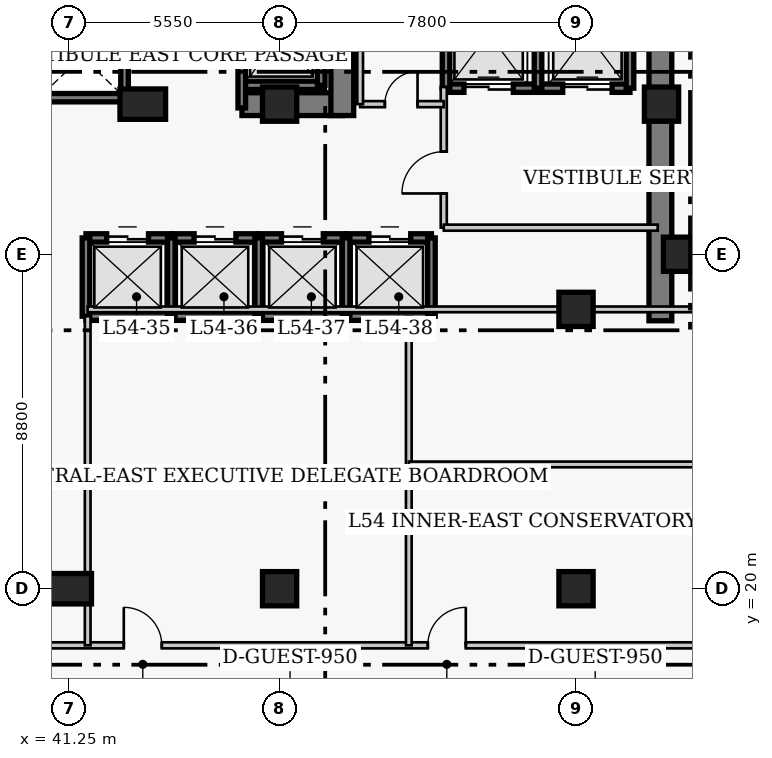
"""IFC4 building model, lengths in metres.
Left out: names, types, materials, properties, quantities, classifications, styles, units other than length and angle.
Written with IfcOpenShell. Run it as: python <this file> out.ifc"""

import sys

from ifc_helpers import new_model, si_unit, direction, frame, frame_2d, origin, origin_2d, place, context, subcontext, project, spatial, rectangle, extrude, element, fill, save


model = new_model("IFC4")
c1 = context("Model", 3, precision=1e-05, world=origin(), true_north=direction((0.0, 1.0)))
c2 = subcontext(c1, "Body", "Model", "MODEL_VIEW")
j1 = project(units=[si_unit("LENGTHUNIT", "METRE"), si_unit("PLANEANGLEUNIT", "RADIAN")], contexts=[c1])
p1 = place(None, origin())
s1 = spatial("IfcSite", under=j1, at=p1, CompositionType="ELEMENT")
p2 = place(p1, origin())
s2 = spatial("IfcBuilding", under=s1, at=p2, CompositionType="ELEMENT")
p3 = place(p2, frame((0.0, 0.0, 216.3)))
s3 = spatial("IfcBuildingStorey", under=s2, at=p3, CompositionType="ELEMENT", Elevation=216.3)
p4 = place(p3, frame((56.82, 27.05, 0.0), z_axis=(0.0, 0.0, 1.0), x_axis=(0.0, 1.0, 0.0)))
e1 = element("IfcWall", 1, at=p4, inside=s3, PredefinedType="SHEAR", context=c2, shape_type="SweptSolid", body=[
    extrude(rectangle(XDim=13.57, YDim=0.6, at=frame_2d((6.785, 0.0))), origin(), (0.0, 0.0, 1.0), 3.9),
])
p5 = place(p3, frame((45.81, 32.75, 0.0), z_axis=(0.0, 0.0, 1.0), x_axis=(1.0, 0.0, 0.0)))
e2 = element("IfcWall", 2, at=p5, inside=s3, PredefinedType="SHEAR", context=c2, shape_type="SweptSolid", body=[
    extrude(rectangle(XDim=2.64, YDim=0.6, at=frame_2d((1.32, 0.0))), origin(), (0.0, 0.0, 1.0), 3.9),
])
p6 = place(p3, frame((48.45, 32.45, 0.0), z_axis=(0.0, 0.0, 1.0), x_axis=(0.0, 1.0, 0.0)))
e3 = element("IfcWall", 3, at=p6, inside=s3, PredefinedType="SHEAR", context=c2, shape_type="SweptSolid", body=[
    extrude(rectangle(XDim=7.87, YDim=0.6, at=frame_2d((3.935, 0.0))), origin(), (0.0, 0.0, 1.0), 3.9),
])
p7 = place(p6, frame((5.75, 0.0, 0.0)))
e4 = element("IfcOpeningElement", 4, at=p7, cuts=e3, PredefinedType="OPENING", context=c2, shape_type="SweptSolid", body=[
    extrude(rectangle(XDim=1.1, YDim=2.15, at=frame_2d((0.55, 1.075))), frame((0.0, 0.31, 0.0), z_axis=(0.0, -1.0, 0.0), x_axis=(1.0, 0.0, 0.0)), (0.0, 0.0, 1.0), 0.62),
])
p8 = place(p3, frame((41.25, 20.0, 0.0), z_axis=(0.0, 0.0, 1.0), x_axis=(1.0, 0.0, 0.0)))
e5 = element("IfcColumn", 5, at=p8, inside=s3, PredefinedType="COLUMN", context=c2, shape_type="SweptSolid", body=[
    extrude(rectangle(XDim=1.2, YDim=0.8, at=origin_2d()), origin(), (0.0, 0.0, 1.0), 3.9),
])
for number, where, z_axis, x_axis in (
    (6, (46.8, 20.0, 0.0), (0.0, 0.0, 1.0), (1.0, 0.0, 0.0)),
    (7, (54.6, 20.0, 0.0), (0.0, 0.0, 1.0), (1.0, 0.0, 0.0)),
    (8, (57.35, 28.8, 0.0), (0.0, 0.0, 1.0), (1.0, 0.0, 0.0)),
):
    element("IfcColumn", number, at=place(p3, frame(where, z_axis=z_axis, x_axis=x_axis)), inside=s3, PredefinedType="COLUMN", context=c2, shape_type="SweptSolid", body=[
        extrude(rectangle(XDim=0.9, YDim=0.9, at=origin_2d()), origin(), (0.0, 0.0, 1.0), 3.9),
    ])
p9 = place(p3, frame((43.2, 32.75, 0.0), z_axis=(0.0, 0.0, 1.0), x_axis=(1.0, 0.0, 0.0)))
e9 = element("IfcColumn", 9, at=p9, inside=s3, PredefinedType="COLUMN", context=c2, shape_type="SweptSolid", body=[
    extrude(rectangle(XDim=1.2, YDim=0.8, at=origin_2d()), origin(), (0.0, 0.0, 1.0), 3.9),
])
for number, where, z_axis, x_axis in (
    (10, (46.8, 32.75, 0.0), (0.0, 0.0, 1.0), (1.0, 0.0, 0.0)),
    (11, (54.6, 27.35, 0.0), (0.0, 0.0, 1.0), (1.0, 0.0, 0.0)),
    (12, (56.85, 32.75, 0.0), (0.0, 0.0, 1.0), (1.0, 0.0, 0.0)),
):
    element("IfcColumn", number, at=place(p3, frame(where, z_axis=z_axis, x_axis=x_axis)), inside=s3, PredefinedType="COLUMN", context=c2, shape_type="SweptSolid", body=[
        extrude(rectangle(XDim=0.9, YDim=0.9, at=origin_2d()), origin(), (0.0, 0.0, 1.0), 3.9),
    ])
p10 = place(p3, frame((41.705, 29.23, 0.0), z_axis=(0.0, 0.0, 1.0), x_axis=(1.0, 0.0, 0.0)))
e13 = element("IfcWall", 13, at=p10, inside=s3, PredefinedType="SHEAR", context=c2, shape_type="SweptSolid", body=[
    extrude(rectangle(XDim=2.245, YDim=0.22, at=frame_2d((1.123, 0.0))), origin(), (0.0, 0.0, 1.0), 3.9),
])
p11 = place(p10, frame((0.545, 0.0, 0.0)))
e14 = element("IfcOpeningElement", 14, at=p11, cuts=e13, PredefinedType="OPENING", context=c2, shape_type="SweptSolid", body=[
    extrude(rectangle(XDim=1.1, YDim=2.15, at=frame_2d((0.55, 1.075))), frame((0.0, 0.12, 0.0), z_axis=(0.0, -1.0, 0.0), x_axis=(1.0, 0.0, 0.0)), (0.0, 0.0, 1.0), 0.24),
])
p12 = place(p3, frame((41.705, 27.17, 0.0), z_axis=(0.0, 0.0, 1.0), x_axis=(1.0, 0.0, 0.0)))
e15 = element("IfcWall", 15, at=p12, inside=s3, PredefinedType="SHEAR", context=c2, shape_type="SweptSolid", body=[
    extrude(rectangle(XDim=2.245, YDim=0.22, at=frame_2d((1.123, 0.0))), origin(), (0.0, 0.0, 1.0), 3.9),
])
p13 = place(p3, frame((41.705, 27.17, 0.0), z_axis=(0.0, 0.0, 1.0), x_axis=(0.0, 1.0, 0.0)))
e16 = element("IfcWall", 16, at=p13, inside=s3, PredefinedType="SHEAR", context=c2, shape_type="SweptSolid", body=[
    extrude(rectangle(XDim=2.06, YDim=0.2, at=frame_2d((1.03, 0.0))), origin(), (0.0, 0.0, 1.0), 3.9),
])
p14 = place(p3, frame((43.95, 29.23, 0.0), z_axis=(0.0, 0.0, 1.0), x_axis=(1.0, 0.0, 0.0)))
e17 = element("IfcWall", 17, at=p14, inside=s3, PredefinedType="SHEAR", context=c2, shape_type="SweptSolid", body=[
    extrude(rectangle(XDim=2.3, YDim=0.22, at=frame_2d((1.15, 0.0))), origin(), (0.0, 0.0, 1.0), 3.9),
])
p15 = place(p14, frame((0.6, 0.0, 0.0)))
e18 = element("IfcOpeningElement", 18, at=p15, cuts=e17, PredefinedType="OPENING", context=c2, shape_type="SweptSolid", body=[
    extrude(rectangle(XDim=1.1, YDim=2.15, at=frame_2d((0.55, 1.075))), frame((0.0, 0.12, 0.0), z_axis=(0.0, -1.0, 0.0), x_axis=(1.0, 0.0, 0.0)), (0.0, 0.0, 1.0), 0.24),
])
p16 = place(p3, frame((43.95, 27.17, 0.0), z_axis=(0.0, 0.0, 1.0), x_axis=(1.0, 0.0, 0.0)))
e19 = element("IfcWall", 19, at=p16, inside=s3, PredefinedType="SHEAR", context=c2, shape_type="SweptSolid", body=[
    extrude(rectangle(XDim=2.3, YDim=0.22, at=frame_2d((1.15, 0.0))), origin(), (0.0, 0.0, 1.0), 3.9),
])
p17 = place(p3, frame((43.95, 27.17, 0.0), z_axis=(0.0, 0.0, 1.0), x_axis=(0.0, 1.0, 0.0)))
e20 = element("IfcWall", 20, at=p17, inside=s3, PredefinedType="SHEAR", context=c2, shape_type="SweptSolid", body=[
    extrude(rectangle(XDim=2.06, YDim=0.2, at=frame_2d((1.03, 0.0))), origin(), (0.0, 0.0, 1.0), 3.9),
])
p18 = place(p3, frame((46.25, 29.23, 0.0), z_axis=(0.0, 0.0, 1.0), x_axis=(1.0, 0.0, 0.0)))
e21 = element("IfcWall", 21, at=p18, inside=s3, PredefinedType="SHEAR", context=c2, shape_type="SweptSolid", body=[
    extrude(rectangle(XDim=2.3, YDim=0.22, at=frame_2d((1.15, 0.0))), origin(), (0.0, 0.0, 1.0), 3.9),
])
p19 = place(p18, frame((0.6, 0.0, 0.0)))
e22 = element("IfcOpeningElement", 22, at=p19, cuts=e21, PredefinedType="OPENING", context=c2, shape_type="SweptSolid", body=[
    extrude(rectangle(XDim=1.1, YDim=2.15, at=frame_2d((0.55, 1.075))), frame((0.0, 0.12, 0.0), z_axis=(0.0, -1.0, 0.0), x_axis=(1.0, 0.0, 0.0)), (0.0, 0.0, 1.0), 0.24),
])
p20 = place(p3, frame((46.25, 27.17, 0.0), z_axis=(0.0, 0.0, 1.0), x_axis=(1.0, 0.0, 0.0)))
e23 = element("IfcWall", 23, at=p20, inside=s3, PredefinedType="SHEAR", context=c2, shape_type="SweptSolid", body=[
    extrude(rectangle(XDim=2.3, YDim=0.22, at=frame_2d((1.15, 0.0))), origin(), (0.0, 0.0, 1.0), 3.9),
])
p21 = place(p3, frame((46.25, 27.17, 0.0), z_axis=(0.0, 0.0, 1.0), x_axis=(0.0, 1.0, 0.0)))
e24 = element("IfcWall", 24, at=p21, inside=s3, PredefinedType="SHEAR", context=c2, shape_type="SweptSolid", body=[
    extrude(rectangle(XDim=2.06, YDim=0.2, at=frame_2d((1.03, 0.0))), origin(), (0.0, 0.0, 1.0), 3.9),
])
p22 = place(p3, frame((48.55, 29.23, 0.0), z_axis=(0.0, 0.0, 1.0), x_axis=(1.0, 0.0, 0.0)))
e25 = element("IfcWall", 25, at=p22, inside=s3, PredefinedType="SHEAR", context=c2, shape_type="SweptSolid", body=[
    extrude(rectangle(XDim=2.245, YDim=0.22, at=frame_2d((1.123, 0.0))), origin(), (0.0, 0.0, 1.0), 3.9),
])
p23 = place(p22, frame((0.6, 0.0, 0.0)))
e26 = element("IfcOpeningElement", 26, at=p23, cuts=e25, PredefinedType="OPENING", context=c2, shape_type="SweptSolid", body=[
    extrude(rectangle(XDim=1.1, YDim=2.15, at=frame_2d((0.55, 1.075))), frame((0.0, 0.12, 0.0), z_axis=(0.0, -1.0, 0.0), x_axis=(1.0, 0.0, 0.0)), (0.0, 0.0, 1.0), 0.24),
])
p24 = place(p3, frame((48.55, 27.17, 0.0), z_axis=(0.0, 0.0, 1.0), x_axis=(1.0, 0.0, 0.0)))
e27 = element("IfcWall", 27, at=p24, inside=s3, PredefinedType="SHEAR", context=c2, shape_type="SweptSolid", body=[
    extrude(rectangle(XDim=2.245, YDim=0.22, at=frame_2d((1.123, 0.0))), origin(), (0.0, 0.0, 1.0), 3.9),
])
for number, where, z_axis, x_axis in (
    (28, (48.55, 27.17, 0.0), (0.0, 0.0, 1.0), (0.0, 1.0, 0.0)),
    (29, (50.795, 27.17, 0.0), (0.0, 0.0, 1.0), (0.0, 1.0, 0.0)),
):
    element("IfcWall", number, at=place(p3, frame(where, z_axis=z_axis, x_axis=x_axis)), inside=s3, PredefinedType="SHEAR", context=c2, shape_type="SweptSolid", body=[
        extrude(rectangle(XDim=2.06, YDim=0.2, at=frame_2d((1.03, 0.0))), origin(), (0.0, 0.0, 1.0), 3.9),
    ])
p25 = place(p3, frame((40.4, 32.92, 0.0), z_axis=(0.0, 0.0, 1.0), x_axis=(1.0, 0.0, 0.0)))
e30 = element("IfcWall", 30, at=p25, inside=s3, PredefinedType="SHEAR", context=c2, shape_type="SweptSolid", body=[
    extrude(rectangle(XDim=2.32, YDim=0.22, at=frame_2d((1.16, 0.0))), origin(), (0.0, 0.0, 1.0), 3.9),
])
p26 = place(p3, frame((42.72, 32.92, 0.0), z_axis=(0.0, 0.0, 1.0), x_axis=(0.0, 1.0, 0.0)))
e31 = element("IfcWall", 31, at=p26, inside=s3, PredefinedType="SHEAR", context=c2, shape_type="SweptSolid", body=[
    extrude(rectangle(XDim=2.16, YDim=0.2, at=frame_2d((1.08, 0.0))), origin(), (0.0, 0.0, 1.0), 3.9),
])
p27 = place(p3, frame((51.18, 33.17, 0.0), z_axis=(0.0, 0.0, 1.0), x_axis=(1.0, 0.0, 0.0)))
e32 = element("IfcWall", 32, at=p27, inside=s3, PredefinedType="SHEAR", context=c2, shape_type="SweptSolid", body=[
    extrude(rectangle(XDim=2.42, YDim=0.22, at=frame_2d((1.21, 0.0))), origin(), (0.0, 0.0, 1.0), 3.9),
])
p28 = place(p27, frame((0.47, 0.0, 0.0)))
e33 = element("IfcOpeningElement", 33, at=p28, cuts=e32, PredefinedType="OPENING", context=c2, shape_type="SweptSolid", body=[
    extrude(rectangle(XDim=1.3, YDim=2.15, at=frame_2d((0.65, 1.075))), frame((0.0, 0.12, 0.0), z_axis=(0.0, -1.0, 0.0), x_axis=(1.0, 0.0, 0.0)), (0.0, 0.0, 1.0), 0.24),
])
p29 = place(p3, frame((51.18, 33.17, 0.0), z_axis=(0.0, 0.0, 1.0), x_axis=(0.0, 1.0, 0.0)))
e34 = element("IfcWall", 34, at=p29, inside=s3, PredefinedType="SHEAR", context=c2, shape_type="SweptSolid", body=[
    extrude(rectangle(XDim=2.86, YDim=0.2, at=frame_2d((1.43, 0.0))), origin(), (0.0, 0.0, 1.0), 3.9),
])
p30 = place(p3, frame((53.6, 33.17, 0.0), z_axis=(0.0, 0.0, 1.0), x_axis=(1.0, 0.0, 0.0)))
e35 = element("IfcWall", 35, at=p30, inside=s3, PredefinedType="SHEAR", context=c2, shape_type="SweptSolid", body=[
    extrude(rectangle(XDim=2.42, YDim=0.22, at=frame_2d((1.21, 0.0))), origin(), (0.0, 0.0, 1.0), 3.9),
])
p31 = place(p30, frame((0.65, 0.0, 0.0)))
e36 = element("IfcOpeningElement", 36, at=p31, cuts=e35, PredefinedType="OPENING", context=c2, shape_type="SweptSolid", body=[
    extrude(rectangle(XDim=1.3, YDim=2.15, at=frame_2d((0.65, 1.075))), frame((0.0, 0.12, 0.0), z_axis=(0.0, -1.0, 0.0), x_axis=(1.0, 0.0, 0.0)), (0.0, 0.0, 1.0), 0.24),
])
for number, where, z_axis, x_axis in (
    (37, (53.6, 33.17, 0.0), (0.0, 0.0, 1.0), (0.0, 1.0, 0.0)),
    (38, (56.02, 33.17, 0.0), (0.0, 0.0, 1.0), (0.0, 1.0, 0.0)),
):
    element("IfcWall", number, at=place(p3, frame(where, z_axis=z_axis, x_axis=x_axis)), inside=s3, PredefinedType="SHEAR", context=c2, shape_type="SweptSolid", body=[
        extrude(rectangle(XDim=2.86, YDim=0.2, at=frame_2d((1.43, 0.0))), origin(), (0.0, 0.0, 1.0), 3.9),
    ])
p32 = place(p3, frame((45.805, 33.245, 0.0), z_axis=(0.0, 0.0, 1.0), x_axis=(1.0, 0.0, 0.0)))
e39 = element("IfcWall", 39, at=p32, inside=s3, PredefinedType="SHEAR", context=c2, shape_type="SweptSolid", body=[
    extrude(rectangle(XDim=2.09, YDim=0.22, at=frame_2d((1.045, 0.0))), origin(), (0.0, 0.0, 1.0), 3.9),
])
p33 = place(p3, frame((45.805, 32.65, 0.0), z_axis=(0.0, 0.0, 1.0), x_axis=(0.0, 1.0, 0.0)))
e40 = element("IfcWall", 40, at=p33, inside=s3, PredefinedType="SHEAR", context=c2, shape_type="SweptSolid", body=[
    extrude(rectangle(XDim=3.505, YDim=0.2, at=frame_2d((1.752, 0.0))), origin(), (0.0, 0.0, 1.0), 3.9),
])
p34 = place(p3, frame((47.895, 33.245, 0.0), z_axis=(0.0, 0.0, 1.0), x_axis=(0.0, 1.0, 0.0)))
e41 = element("IfcWall", 41, at=p34, inside=s3, PredefinedType="SHEAR", context=c2, shape_type="SweptSolid", body=[
    extrude(rectangle(XDim=2.91, YDim=0.2, at=frame_2d((1.455, 0.0))), origin(), (0.0, 0.0, 1.0), 3.9),
])
p35 = place(p3, frame((51.12, 29.5, 0.0), z_axis=(0.0, 0.0, 1.0), x_axis=(0.0, 1.0, 0.0)))
e42 = element("IfcWall", 42, at=p35, inside=s3, PredefinedType="PARTITIONING", context=c2, shape_type="SweptSolid", body=[
    extrude(rectangle(XDim=3.7, YDim=0.16, at=frame_2d((1.85, 0.0))), origin(), (0.0, 0.0, 1.0), 3.65),
])
p36 = place(p35, frame((0.9, 0.0, 0.0)))
e43 = element("IfcOpeningElement", 43, at=p36, cuts=e42, PredefinedType="OPENING", context=c2, shape_type="SweptSolid", body=[
    extrude(rectangle(XDim=1.1, YDim=2.15, at=frame_2d((0.55, 1.075))), frame((0.0, 0.09, 0.0), z_axis=(0.0, -1.0, 0.0), x_axis=(1.0, 0.0, 0.0)), (0.0, 0.0, 1.0), 0.18),
])
p37 = place(p3, frame((51.12, 29.5, 0.0), z_axis=(0.0, 0.0, 1.0), x_axis=(1.0, 0.0, 0.0)))
e44 = element("IfcWall", 44, at=p37, inside=s3, PredefinedType="PARTITIONING", context=c2, shape_type="SweptSolid", body=[
    extrude(rectangle(XDim=5.63, YDim=0.16, at=frame_2d((2.815, 0.0))), origin(), (0.0, 0.0, 1.0), 3.65),
])
p38 = place(p3, frame((48.92, 32.75, 0.0), z_axis=(0.0, 0.0, 1.0), x_axis=(1.0, 0.0, 0.0)))
e45 = element("IfcWall", 45, at=p38, inside=s3, PredefinedType="PARTITIONING", context=c2, shape_type="SweptSolid", body=[
    extrude(rectangle(XDim=2.2, YDim=0.16, at=frame_2d((1.1, 0.0))), origin(), (0.0, 0.0, 1.0), 3.65),
])
p39 = place(p38, frame((0.65, 0.0, 0.0)))
e46 = element("IfcOpeningElement", 46, at=p39, cuts=e45, PredefinedType="OPENING", context=c2, shape_type="SweptSolid", body=[
    extrude(rectangle(XDim=0.86, YDim=2.05, at=frame_2d((0.43, 1.025))), frame((0.0, 0.09, 0.0), z_axis=(0.0, -1.0, 0.0), x_axis=(1.0, 0.0, 0.0)), (0.0, 0.0, 1.0), 0.18),
])
p40 = place(p3, frame((48.92, 32.75, 0.0), z_axis=(0.0, 0.0, 1.0), x_axis=(0.0, 1.0, 0.0)))
e47 = element("IfcWall", 47, at=p40, inside=s3, PredefinedType="PARTITIONING", context=c2, shape_type="SweptSolid", body=[
    extrude(rectangle(XDim=3.62, YDim=0.15, at=frame_2d((1.81, 0.0))), origin(), (0.0, 0.0, 1.0), 3.65),
])
p41 = place(p3, frame((35.85, 18.51, 0.0), z_axis=(0.0, 0.0, 1.0), x_axis=(1.0, 0.0, 0.0)))
e48 = element("IfcWall", 48, at=p41, inside=s3, PredefinedType="PARTITIONING", context=c2, shape_type="SweptSolid", body=[
    extrude(rectangle(XDim=22.45, YDim=0.16, at=frame_2d((11.225, 0.0))), origin(), (0.0, 0.0, 1.0), 3.65),
])
p42 = place(p41, frame((6.85, 0.0, 0.0)))
e49 = element("IfcOpeningElement", 49, at=p42, cuts=e48, PredefinedType="OPENING", context=c2, shape_type="SweptSolid", body=[
    extrude(rectangle(XDim=1.0, YDim=2.15, at=frame_2d((0.5, 1.075))), frame((0.0, 0.09, 0.0), z_axis=(0.0, -1.0, 0.0), x_axis=(1.0, 0.0, 0.0)), (0.0, 0.0, 1.0), 0.18),
])
p43 = place(p41, frame((14.85, 0.0, 0.0)))
e50 = element("IfcOpeningElement", 50, at=p43, cuts=e48, PredefinedType="OPENING", context=c2, shape_type="SweptSolid", body=[
    extrude(rectangle(XDim=1.0, YDim=2.15, at=frame_2d((0.5, 1.075))), frame((0.0, 0.09, 0.0), z_axis=(0.0, -1.0, 0.0), x_axis=(1.0, 0.0, 0.0)), (0.0, 0.0, 1.0), 0.18),
])
p44 = place(p3, frame((41.75, 18.51, 0.0), z_axis=(0.0, 0.0, 1.0), x_axis=(0.0, 1.0, 0.0)))
e51 = element("IfcWall", 51, at=p44, inside=s3, PredefinedType="PARTITIONING", context=c2, shape_type="SweptSolid", body=[
    extrude(rectangle(XDim=8.66, YDim=0.15, at=frame_2d((4.33, 0.0))), origin(), (0.0, 0.0, 1.0), 3.65),
])
p45 = place(p3, frame((50.2, 18.51, 0.0), z_axis=(0.0, 0.0, 1.0), x_axis=(0.0, 1.0, 0.0)))
e52 = element("IfcWall", 52, at=p45, inside=s3, PredefinedType="PARTITIONING", context=c2, shape_type="SweptSolid", body=[
    extrude(rectangle(XDim=8.64, YDim=0.15, at=frame_2d((4.32, 0.0))), origin(), (0.0, 0.0, 1.0), 3.65),
])
p46 = place(p3, frame((41.75, 27.35, 0.0), z_axis=(0.0, 0.0, 1.0), x_axis=(1.0, 0.0, 0.0)))
e53 = element("IfcWall", 53, at=p46, inside=s3, PredefinedType="PARTITIONING", context=c2, shape_type="SweptSolid", body=[
    extrude(rectangle(XDim=16.49, YDim=0.15, at=frame_2d((8.245, 0.0))), origin(), (0.0, 0.0, 1.0), 3.65),
])
p47 = place(p3, frame((50.2, 23.27, 0.0), z_axis=(0.0, 0.0, 1.0), x_axis=(1.0, 0.0, 0.0)))
e54 = element("IfcWall", 54, at=p47, inside=s3, PredefinedType="PARTITIONING", context=c2, shape_type="SweptSolid", body=[
    extrude(rectangle(XDim=8.04, YDim=0.15, at=frame_2d((4.02, 0.0))), origin(), (0.0, 0.0, 1.0), 3.65),
])
p48 = place(p11, origin())
e55 = element("IfcDoor", 55, at=p48, inside=s3, OperationType="DOUBLE_DOOR_SLIDING", PredefinedType="DOOR", context=c2, shape_type="SweptSolid", body=[
    extrude(rectangle(XDim=1.1, YDim=2.15, at=frame_2d((0.55, 1.075))), frame((0.0, 0.025, 0.0), z_axis=(0.0, -1.0, 0.0), x_axis=(1.0, 0.0, 0.0)), (0.0, 0.0, 1.0), 0.05),
])
fill(e14, e55)
p49 = place(p15, origin())
e56 = element("IfcDoor", 56, at=p49, inside=s3, OperationType="DOUBLE_DOOR_SLIDING", PredefinedType="DOOR", context=c2, shape_type="SweptSolid", body=[
    extrude(rectangle(XDim=1.1, YDim=2.15, at=frame_2d((0.55, 1.075))), frame((0.0, 0.025, 0.0), z_axis=(0.0, -1.0, 0.0), x_axis=(1.0, 0.0, 0.0)), (0.0, 0.0, 1.0), 0.05),
])
fill(e18, e56)
p50 = place(p19, origin())
e57 = element("IfcDoor", 57, at=p50, inside=s3, OperationType="DOUBLE_DOOR_SLIDING", PredefinedType="DOOR", context=c2, shape_type="SweptSolid", body=[
    extrude(rectangle(XDim=1.1, YDim=2.15, at=frame_2d((0.55, 1.075))), frame((0.0, 0.025, 0.0), z_axis=(0.0, -1.0, 0.0), x_axis=(1.0, 0.0, 0.0)), (0.0, 0.0, 1.0), 0.05),
])
fill(e22, e57)
p51 = place(p23, origin())
e58 = element("IfcDoor", 58, at=p51, inside=s3, OperationType="DOUBLE_DOOR_SLIDING", PredefinedType="DOOR", context=c2, shape_type="SweptSolid", body=[
    extrude(rectangle(XDim=1.1, YDim=2.15, at=frame_2d((0.55, 1.075))), frame((0.0, 0.025, 0.0), z_axis=(0.0, -1.0, 0.0), x_axis=(1.0, 0.0, 0.0)), (0.0, 0.0, 1.0), 0.05),
])
fill(e26, e58)
p52 = place(p28, origin())
e59 = element("IfcDoor", 59, at=p52, inside=s3, OperationType="DOUBLE_DOOR_SLIDING", PredefinedType="DOOR", context=c2, shape_type="SweptSolid", body=[
    extrude(rectangle(XDim=1.3, YDim=2.15, at=frame_2d((0.65, 1.075))), frame((0.0, 0.025, 0.0), z_axis=(0.0, -1.0, 0.0), x_axis=(1.0, 0.0, 0.0)), (0.0, 0.0, 1.0), 0.05),
])
fill(e33, e59)
p53 = place(p31, origin())
e60 = element("IfcDoor", 60, at=p53, inside=s3, OperationType="DOUBLE_DOOR_SLIDING", PredefinedType="DOOR", context=c2, shape_type="SweptSolid", body=[
    extrude(rectangle(XDim=1.3, YDim=2.15, at=frame_2d((0.65, 1.075))), frame((0.0, 0.025, 0.0), z_axis=(0.0, -1.0, 0.0), x_axis=(1.0, 0.0, 0.0)), (0.0, 0.0, 1.0), 0.05),
])
fill(e36, e60)
p54 = place(p36, origin())
e61 = element("IfcDoor", 61, at=p54, inside=s3, OperationType="SINGLE_SWING_LEFT", PredefinedType="DOOR", context=c2, shape_type="SweptSolid", body=[
    extrude(rectangle(XDim=1.1, YDim=2.15, at=frame_2d((0.55, 1.075))), frame((0.0, 0.025, 0.0), z_axis=(0.0, -1.0, 0.0), x_axis=(1.0, 0.0, 0.0)), (0.0, 0.0, 1.0), 0.05),
])
fill(e43, e61)
p55 = place(p39, origin())
e62 = element("IfcDoor", 62, at=p55, inside=s3, OperationType="SINGLE_SWING_RIGHT", PredefinedType="DOOR", context=c2, shape_type="SweptSolid", body=[
    extrude(rectangle(XDim=0.86, YDim=2.05, at=frame_2d((0.43, 1.025))), frame((0.0, 0.025, 0.0), z_axis=(0.0, -1.0, 0.0), x_axis=(1.0, 0.0, 0.0)), (0.0, 0.0, 1.0), 0.05),
])
fill(e46, e62)
p56 = place(p42, origin())
e63 = element("IfcDoor", 63, at=p56, inside=s3, OperationType="SINGLE_SWING_LEFT", PredefinedType="DOOR", context=c2, shape_type="SweptSolid", body=[
    extrude(rectangle(XDim=1.0, YDim=2.15, at=frame_2d((0.5, 1.075))), frame((0.0, 0.025, 0.0), z_axis=(0.0, -1.0, 0.0), x_axis=(1.0, 0.0, 0.0)), (0.0, 0.0, 1.0), 0.05),
])
fill(e49, e63)
p57 = place(p43, origin())
e64 = element("IfcDoor", 64, at=p57, inside=s3, OperationType="SINGLE_SWING_RIGHT", PredefinedType="DOOR", context=c2, shape_type="SweptSolid", body=[
    extrude(rectangle(XDim=1.0, YDim=2.15, at=frame_2d((0.5, 1.075))), frame((0.0, 0.025, 0.0), z_axis=(0.0, -1.0, 0.0), x_axis=(1.0, 0.0, 0.0)), (0.0, 0.0, 1.0), 0.05),
])
fill(e50, e64)
save(model, sys.argv[1])
